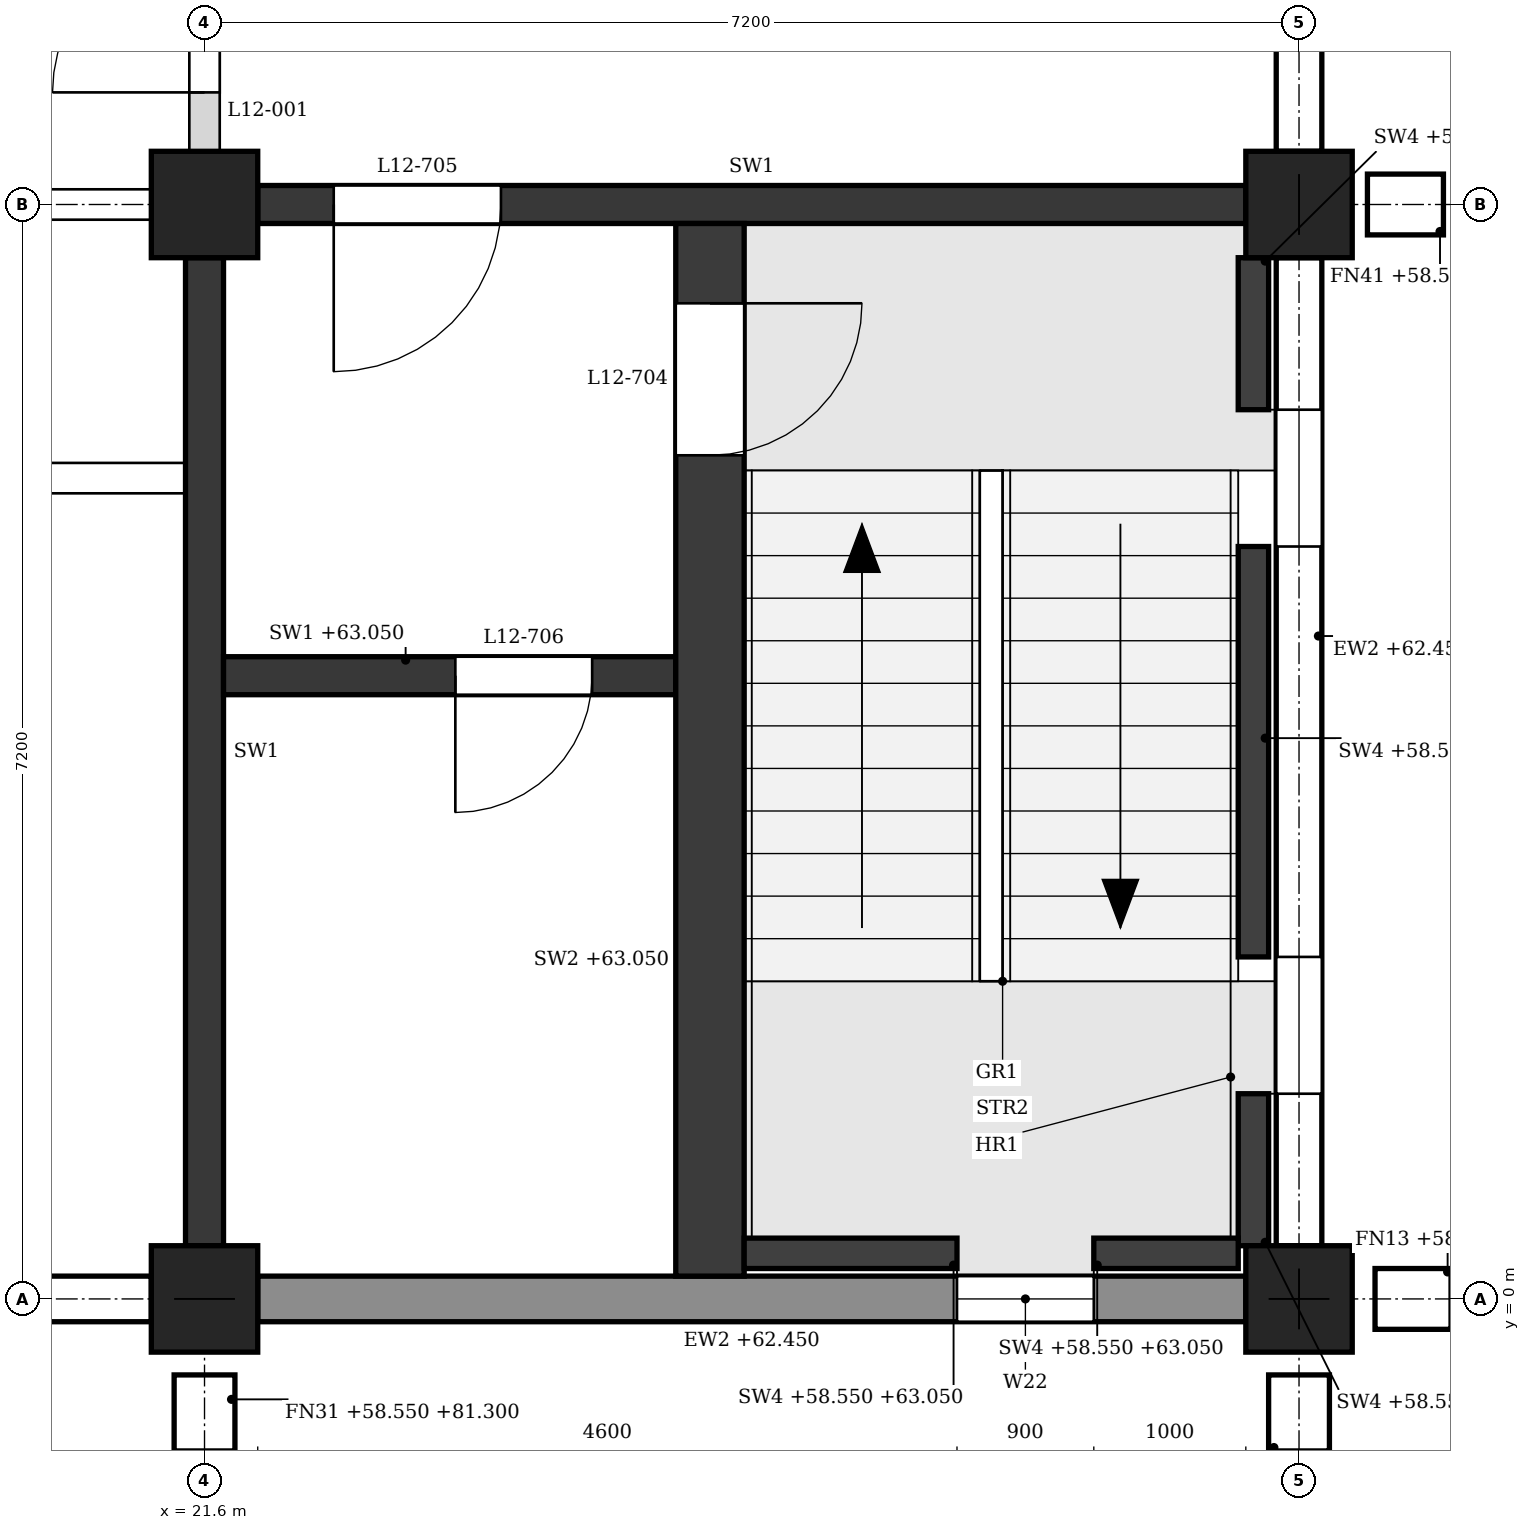
"""IFC4 building model, lengths in metres.
Left out: names, types, materials, properties, quantities, classifications, styles, units other than length and angle.
Written with IfcOpenShell. Run it as: python <this file> out.ifc"""

import sys

from ifc_helpers import new_model, si_unit, direction, frame, frame_2d, origin, origin_2d, place, context, subcontext, project, spatial, polyline, rectangle, outline, extrude, element, fill, save


model = new_model("IFC4")
c1 = context("Model", 3, precision=1e-05, world=origin(), true_north=direction((0.0, 1.0)))
c2 = subcontext(c1, "Body", "Model", "MODEL_VIEW")
j1 = project(units=[si_unit("LENGTHUNIT", "METRE"), si_unit("PLANEANGLEUNIT", "RADIAN")], contexts=[c1])
p1 = place(None, origin())
s1 = spatial("IfcSite", under=j1, at=p1, CompositionType="ELEMENT")
p2 = place(p1, origin())
s2 = spatial("IfcBuilding", under=s1, at=p2, CompositionType="ELEMENT")
p3 = place(p2, frame((0.0, 0.0, 58.8)))
s3 = spatial("IfcBuildingStorey", under=s2, at=p3, CompositionType="ELEMENT", Elevation=58.8)
for number, where, z_axis, x_axis in (
    (1, (21.6, 0.0, 0.0), (0.0, 0.0, 1.0), (1.0, 0.0, 0.0)),
    (2, (21.6, 7.2, 0.0), (0.0, 0.0, 1.0), (1.0, 0.0, 0.0)),
    (3, (28.8, 0.0, 0.0), (0.0, 0.0, 1.0), (1.0, 0.0, 0.0)),
    (4, (28.8, 7.2, 0.0), (0.0, 0.0, 1.0), (1.0, 0.0, 0.0)),
):
    element("IfcColumn", number, at=place(p3, frame(where, z_axis=z_axis, x_axis=x_axis)), inside=s3, PredefinedType="COLUMN", context=c2, shape_type="SweptSolid", body=[
        extrude(rectangle(XDim=0.7, YDim=0.7, at=origin_2d()), origin(), (0.0, 0.0, 1.0), 4.5),
    ])
p4 = place(p3, frame((14.75, 0.0, 0.0), z_axis=(0.0, 0.0, 1.0), x_axis=(1.0, 0.0, 0.0)))
e5 = element("IfcWall", 5, at=p4, inside=s3, PredefinedType="STANDARD", context=c2, shape_type="SweptSolid", body=[
    extrude(rectangle(XDim=6.5, YDim=0.3, at=frame_2d((3.25, 0.0))), origin(), (0.0, 0.0, 1.0), 3.65),
])
p5 = place(p4, frame((0.7, 0.0, 0.9)))
e6 = element("IfcOpeningElement", 6, at=p5, cuts=e5, PredefinedType="OPENING", context=c2, shape_type="SweptSolid", body=[
    extrude(outline(polyline([(0.0, 0.0), (1.5, 0.0), (1.5, 1.95), (0.75, 2.7), (0.0, 1.95), (0.0, 0.0)])), frame((0.0, 0.16, 0.0), z_axis=(0.0, -1.0, 0.0), x_axis=(1.0, 0.0, 0.0)), (0.0, 0.0, 1.0), 0.32),
])
p6 = place(p4, frame((4.3, 0.0, 0.9)))
e7 = element("IfcOpeningElement", 7, at=p6, cuts=e5, PredefinedType="OPENING", context=c2, shape_type="SweptSolid", body=[
    extrude(outline(polyline([(0.0, 0.0), (1.5, 0.0), (1.5, 1.95), (0.75, 2.7), (0.0, 1.95), (0.0, 0.0)])), frame((0.0, 0.16, 0.0), z_axis=(0.0, -1.0, 0.0), x_axis=(1.0, 0.0, 0.0)), (0.0, 0.0, 1.0), 0.32),
])
p7 = place(p3, frame((21.95, 0.0, 0.0), z_axis=(0.0, 0.0, 1.0), x_axis=(1.0, 0.0, 0.0)))
e8 = element("IfcWall", 8, at=p7, inside=s3, PredefinedType="STANDARD", context=c2, shape_type="SweptSolid", body=[
    extrude(rectangle(XDim=6.5, YDim=0.3, at=frame_2d((3.25, 0.0))), origin(), (0.0, 0.0, 1.0), 3.65),
])
p8 = place(p7, frame((4.6, 0.0, 0.9)))
e9 = element("IfcOpeningElement", 9, at=p8, cuts=e8, PredefinedType="OPENING", context=c2, shape_type="SweptSolid", body=[
    extrude(outline(polyline([(0.0, 0.0), (0.9, 0.0), (0.9, 2.25), (0.45, 2.7), (0.0, 2.25), (0.0, 0.0)])), frame((0.0, 0.16, 0.0), z_axis=(0.0, -1.0, 0.0), x_axis=(1.0, 0.0, 0.0)), (0.0, 0.0, 1.0), 0.32),
])
p9 = place(p3, frame((28.8, 0.35, 0.0), z_axis=(0.0, 0.0, 1.0), x_axis=(0.0, 1.0, 0.0)))
e10 = element("IfcWall", 10, at=p9, inside=s3, PredefinedType="STANDARD", context=c2, shape_type="SweptSolid", body=[
    extrude(rectangle(XDim=6.5, YDim=0.3, at=frame_2d((3.25, 0.0))), origin(), (0.0, 0.0, 1.0), 3.65),
])
p10 = place(p9, frame((1.0, 0.0, 0.9)))
e11 = element("IfcOpeningElement", 11, at=p10, cuts=e10, PredefinedType="OPENING", context=c2, shape_type="SweptSolid", body=[
    extrude(outline(polyline([(0.0, 0.0), (0.9, 0.0), (0.9, 2.25), (0.45, 2.7), (0.0, 2.25), (0.0, 0.0)])), frame((0.0, 0.16, 0.0), z_axis=(0.0, -1.0, 0.0), x_axis=(1.0, 0.0, 0.0)), (0.0, 0.0, 1.0), 0.32),
])
p11 = place(p9, frame((4.6, 0.0, 0.9)))
e12 = element("IfcOpeningElement", 12, at=p11, cuts=e10, PredefinedType="OPENING", context=c2, shape_type="SweptSolid", body=[
    extrude(outline(polyline([(0.0, 0.0), (0.9, 0.0), (0.9, 2.25), (0.45, 2.7), (0.0, 2.25), (0.0, 0.0)])), frame((0.0, 0.16, 0.0), z_axis=(0.0, -1.0, 0.0), x_axis=(1.0, 0.0, 0.0)), (0.0, 0.0, 1.0), 0.32),
])
p12 = place(p3, frame((28.8, 7.55, 0.0), z_axis=(0.0, 0.0, 1.0), x_axis=(0.0, 1.0, 0.0)))
e13 = element("IfcWall", 13, at=p12, inside=s3, PredefinedType="STANDARD", context=c2, shape_type="SweptSolid", body=[
    extrude(rectangle(XDim=6.5, YDim=0.3, at=frame_2d((3.25, 0.0))), origin(), (0.0, 0.0, 1.0), 3.65),
])
p13 = place(p12, frame((0.7, 0.0, 0.9)))
e14 = element("IfcOpeningElement", 14, at=p13, cuts=e13, PredefinedType="OPENING", context=c2, shape_type="SweptSolid", body=[
    extrude(outline(polyline([(0.0, 0.0), (1.5, 0.0), (1.5, 1.95), (0.75, 2.7), (0.0, 1.95), (0.0, 0.0)])), frame((0.0, 0.16, 0.0), z_axis=(0.0, -1.0, 0.0), x_axis=(1.0, 0.0, 0.0)), (0.0, 0.0, 1.0), 0.32),
])
p14 = place(p3, frame((21.6, -0.5, -0.25), z_axis=(0.0, 0.0, 1.0), x_axis=(0.0, -1.0, 0.0)))
e15 = element("IfcWall", 15, at=p14, inside=s3, PredefinedType="POLYGONAL", context=c2, shape_type="SweptSolid", body=[
    extrude(outline(polyline([(0.5, 0.0), (0.5, 22.225), (0.15, 22.75), (0.0, 22.75), (0.0, 0.0), (0.5, 0.0)])), frame((0.0, 0.2, 0.0), z_axis=(0.0, -1.0, 0.0), x_axis=(1.0, 0.0, 0.0)), (0.0, 0.0, 1.0), 0.4),
])
for number, where, z_axis, x_axis in (
    (16, (28.8, -0.5, -0.25), (0.0, 0.0, 1.0), (0.0, -1.0, 0.0)),
    (17, (29.3, 0.0, -0.25), (0.0, 0.0, 1.0), (1.0, 0.0, 0.0)),
):
    element("IfcWall", number, at=place(p3, frame(where, z_axis=z_axis, x_axis=x_axis)), inside=s3, PredefinedType="POLYGONAL", context=c2, shape_type="SweptSolid", body=[
        extrude(outline(polyline([(0.5, 0.0), (0.5, 23.85), (0.0, 23.85), (0.0, 0.0), (0.5, 0.0)])), frame((0.0, 0.2, 0.0), z_axis=(0.0, -1.0, 0.0), x_axis=(1.0, 0.0, 0.0)), (0.0, 0.0, 1.0), 0.4),
    ])
p15 = place(p3, frame((29.25, 7.2, -0.25), z_axis=(0.0, 0.0, 1.0), x_axis=(1.0, 0.0, 0.0)))
e18 = element("IfcWall", 18, at=p15, inside=s3, PredefinedType="POLYGONAL", context=c2, shape_type="SweptSolid", body=[
    extrude(outline(polyline([(0.5, 0.0), (0.5, 22.225), (0.15, 22.75), (0.0, 22.75), (0.0, 0.0), (0.5, 0.0)])), frame((0.0, 0.2, 0.0), z_axis=(0.0, -1.0, 0.0), x_axis=(1.0, 0.0, 0.0)), (0.0, 0.0, 1.0), 0.4),
])
p16 = place(p3, frame((21.95, 7.2, 0.0), z_axis=(0.0, 0.0, 1.0), x_axis=(1.0, 0.0, 0.0)))
e19 = element("IfcWall", 19, at=p16, inside=s3, PredefinedType="SHEAR", context=c2, shape_type="SweptSolid", body=[
    extrude(rectangle(XDim=6.5, YDim=0.25, at=frame_2d((3.25, 0.0))), origin(), (0.0, 0.0, 1.0), 3.6),
])
p17 = place(p16, frame((0.5, 0.0, 0.0)))
e20 = element("IfcOpeningElement", 20, at=p17, cuts=e19, PredefinedType="OPENING", context=c2, shape_type="SweptSolid", body=[
    extrude(rectangle(XDim=1.1, YDim=2.1, at=frame_2d((0.55, 1.05))), frame((0.0, 0.135, 0.0), z_axis=(0.0, -1.0, 0.0), x_axis=(1.0, 0.0, 0.0)), (0.0, 0.0, 1.0), 0.27),
])
p18 = place(p3, frame((21.6, 0.35, 0.0), z_axis=(0.0, 0.0, 1.0), x_axis=(0.0, 1.0, 0.0)))
e21 = element("IfcWall", 21, at=p18, inside=s3, PredefinedType="SHEAR", context=c2, shape_type="SweptSolid", body=[
    extrude(rectangle(XDim=6.5, YDim=0.25, at=frame_2d((3.25, 0.0))), origin(), (0.0, 0.0, 1.0), 3.6),
])
p19 = place(p3, frame((28.5, 0.35, -0.25), z_axis=(0.0, 0.0, 1.0), x_axis=(0.0, 1.0, 0.0)))
e22 = element("IfcWall", 22, at=p19, inside=s3, PredefinedType="SHEAR", context=c2, shape_type="SweptSolid", body=[
    extrude(rectangle(XDim=1.0, YDim=0.2, at=frame_2d((0.5, 0.0))), origin(), (0.0, 0.0, 1.0), 4.5),
])
p20 = place(p3, frame((28.5, 2.25, -0.25), z_axis=(0.0, 0.0, 1.0), x_axis=(0.0, 1.0, 0.0)))
e23 = element("IfcWall", 23, at=p20, inside=s3, PredefinedType="SHEAR", context=c2, shape_type="SweptSolid", body=[
    extrude(rectangle(XDim=2.7, YDim=0.2, at=frame_2d((1.35, 0.0))), origin(), (0.0, 0.0, 1.0), 4.5),
])
p21 = place(p3, frame((28.5, 5.85, -0.25), z_axis=(0.0, 0.0, 1.0), x_axis=(0.0, 1.0, 0.0)))
e24 = element("IfcWall", 24, at=p21, inside=s3, PredefinedType="SHEAR", context=c2, shape_type="SweptSolid", body=[
    extrude(rectangle(XDim=1.0, YDim=0.2, at=frame_2d((0.5, 0.0))), origin(), (0.0, 0.0, 1.0), 4.5),
])
p22 = place(p3, frame((25.15, 0.3, -0.25), z_axis=(0.0, 0.0, 1.0), x_axis=(1.0, 0.0, 0.0)))
e25 = element("IfcWall", 25, at=p22, inside=s3, PredefinedType="SHEAR", context=c2, shape_type="SweptSolid", body=[
    extrude(rectangle(XDim=1.4, YDim=0.2, at=frame_2d((0.7, 0.0))), origin(), (0.0, 0.0, 1.0), 4.5),
])
p23 = place(p3, frame((27.45, 0.3, -0.25), z_axis=(0.0, 0.0, 1.0), x_axis=(1.0, 0.0, 0.0)))
e26 = element("IfcWall", 26, at=p23, inside=s3, PredefinedType="SHEAR", context=c2, shape_type="SweptSolid", body=[
    extrude(rectangle(XDim=0.95, YDim=0.2, at=frame_2d((0.475, 0.0))), origin(), (0.0, 0.0, 1.0), 4.5),
])
p24 = place(p3, frame((24.925, 0.15, 0.0), z_axis=(0.0, 0.0, 1.0), x_axis=(0.0, 1.0, 0.0)))
e27 = element("IfcWall", 27, at=p24, inside=s3, PredefinedType="SHEAR", context=c2, shape_type="SweptSolid", body=[
    extrude(rectangle(XDim=6.925, YDim=0.45, at=frame_2d((3.462, 0.0))), origin(), (0.0, 0.0, 1.0), 4.25),
])
p25 = place(p24, frame((5.4, 0.0, 0.0)))
e28 = element("IfcOpeningElement", 28, at=p25, cuts=e27, PredefinedType="OPENING", context=c2, shape_type="SweptSolid", body=[
    extrude(rectangle(XDim=1.0, YDim=2.1, at=frame_2d((0.5, 1.05))), frame((0.0, 0.235, 0.0), z_axis=(0.0, -1.0, 0.0), x_axis=(1.0, 0.0, 0.0)), (0.0, 0.0, 1.0), 0.47),
])
p26 = place(p3, frame((21.725, 4.1, 0.0), z_axis=(0.0, 0.0, 1.0), x_axis=(1.0, 0.0, 0.0)))
e29 = element("IfcWall", 29, at=p26, inside=s3, PredefinedType="SHEAR", context=c2, shape_type="SweptSolid", body=[
    extrude(rectangle(XDim=2.975, YDim=0.25, at=frame_2d((1.487, 0.0))), origin(), (0.0, 0.0, 1.0), 4.25),
])
p27 = place(p26, frame((1.525, 0.0, 0.0)))
e30 = element("IfcOpeningElement", 30, at=p27, cuts=e29, PredefinedType="OPENING", context=c2, shape_type="SweptSolid", body=[
    extrude(rectangle(XDim=0.9, YDim=2.1, at=frame_2d((0.45, 1.05))), frame((0.0, 0.135, 0.0), z_axis=(0.0, -1.0, 0.0), x_axis=(1.0, 0.0, 0.0)), (0.0, 0.0, 1.0), 0.27),
])
p28 = place(p3, frame((7.325, 5.4, 0.0), z_axis=(0.0, 0.0, 1.0), x_axis=(1.0, 0.0, 0.0)))
e31 = element("IfcWall", 31, at=p28, inside=s3, PredefinedType="PARTITIONING", context=c2, shape_type="SweptSolid", body=[
    extrude(outline(polyline([(0.0, 0.0), (14.15, 0.0), (14.15, 3.6), (14.075, 3.6), (14.075, 4.25), (7.275, 4.25), (7.275, 3.6), (6.875, 3.6), (6.875, 4.25), (0.075, 4.25), (0.075, 3.6), (0.0, 3.6), (0.0, 0.0)])), frame((0.0, 0.1, 0.0), z_axis=(0.0, -1.0, 0.0), x_axis=(1.0, 0.0, 0.0)), (0.0, 0.0, 1.0), 0.2),
])
p29 = place(p28, frame((1.238, 0.0, 0.0)))
e32 = element("IfcOpeningElement", 32, at=p29, cuts=e31, PredefinedType="OPENING", context=c2, shape_type="SweptSolid", body=[
    extrude(rectangle(XDim=1.0, YDim=2.1, at=frame_2d((0.5, 1.05))), frame((0.0, 0.11, 0.0), z_axis=(0.0, -1.0, 0.0), x_axis=(1.0, 0.0, 0.0)), (0.0, 0.0, 1.0), 0.22),
])
p30 = place(p28, frame((4.775, 0.0, 0.0)))
e33 = element("IfcOpeningElement", 33, at=p30, cuts=e31, PredefinedType="OPENING", context=c2, shape_type="SweptSolid", body=[
    extrude(rectangle(XDim=1.0, YDim=2.1, at=frame_2d((0.5, 1.05))), frame((0.0, 0.11, 0.0), z_axis=(0.0, -1.0, 0.0), x_axis=(1.0, 0.0, 0.0)), (0.0, 0.0, 1.0), 0.22),
])
p31 = place(p28, frame((8.375, 0.0, 0.0)))
e34 = element("IfcOpeningElement", 34, at=p31, cuts=e31, PredefinedType="OPENING", context=c2, shape_type="SweptSolid", body=[
    extrude(rectangle(XDim=1.0, YDim=2.1, at=frame_2d((0.5, 1.05))), frame((0.0, 0.11, 0.0), z_axis=(0.0, -1.0, 0.0), x_axis=(1.0, 0.0, 0.0)), (0.0, 0.0, 1.0), 0.22),
])
p32 = place(p28, frame((11.913, 0.0, 0.0)))
e35 = element("IfcOpeningElement", 35, at=p32, cuts=e31, PredefinedType="OPENING", context=c2, shape_type="SweptSolid", body=[
    extrude(rectangle(XDim=1.0, YDim=2.1, at=frame_2d((0.5, 1.05))), frame((0.0, 0.11, 0.0), z_axis=(0.0, -1.0, 0.0), x_axis=(1.0, 0.0, 0.0)), (0.0, 0.0, 1.0), 0.22),
])
p33 = place(p3, frame((14.75, 7.2, 0.0), z_axis=(0.0, 0.0, 1.0), x_axis=(1.0, 0.0, 0.0)))
e36 = element("IfcWall", 36, at=p33, inside=s3, PredefinedType="PARTITIONING", context=c2, shape_type="SweptSolid", body=[
    extrude(rectangle(XDim=6.5, YDim=0.2, at=frame_2d((3.25, 0.0))), origin(), (0.0, 0.0, 1.0), 3.6),
])
p34 = place(p33, frame((4.375, 0.0, 0.0)))
e37 = element("IfcOpeningElement", 37, at=p34, cuts=e36, PredefinedType="OPENING", context=c2, shape_type="SweptSolid", body=[
    extrude(rectangle(XDim=1.0, YDim=2.1, at=frame_2d((0.5, 1.05))), frame((0.0, 0.11, 0.0), z_axis=(0.0, -1.0, 0.0), x_axis=(1.0, 0.0, 0.0)), (0.0, 0.0, 1.0), 0.22),
])
p35 = place(p3, frame((21.6, 7.55, 0.0), z_axis=(0.0, 0.0, 1.0), x_axis=(0.0, 1.0, 0.0)))
e38 = element("IfcWall", 38, at=p35, inside=s3, PredefinedType="PARTITIONING", context=c2, shape_type="SweptSolid", body=[
    extrude(rectangle(XDim=2.775, YDim=0.2, at=frame_2d((1.387, 0.0))), origin(), (0.0, 0.0, 1.0), 3.6),
])
p36 = place(p35, frame((0.387, 0.0, 0.0)))
e39 = element("IfcOpeningElement", 39, at=p36, cuts=e38, PredefinedType="OPENING", context=c2, shape_type="SweptSolid", body=[
    extrude(rectangle(XDim=2.0, YDim=2.4, at=frame_2d((1.0, 1.2))), frame((0.0, 0.11, 0.0), z_axis=(0.0, -1.0, 0.0), x_axis=(1.0, 0.0, 0.0)), (0.0, 0.0, 1.0), 0.22),
])
p37 = place(p10, origin())
e40 = element("IfcWindow", 40, at=p37, inside=s3, PartitioningType="SINGLE_PANEL", PredefinedType="WINDOW", context=c2, shape_type="SweptSolid", body=[
    extrude(outline(polyline([(0.0, 0.0), (0.9, 0.0), (0.9, 2.25), (0.45, 2.7), (0.0, 2.25), (0.0, 0.0)])), frame((0.0, 0.03, 0.0), z_axis=(0.0, -1.0, 0.0), x_axis=(1.0, 0.0, 0.0)), (0.0, 0.0, 1.0), 0.06),
])
fill(e11, e40)
p38 = place(p11, origin())
e41 = element("IfcWindow", 41, at=p38, inside=s3, PartitioningType="SINGLE_PANEL", PredefinedType="WINDOW", context=c2, shape_type="SweptSolid", body=[
    extrude(outline(polyline([(0.0, 0.0), (0.9, 0.0), (0.9, 2.25), (0.45, 2.7), (0.0, 2.25), (0.0, 0.0)])), frame((0.0, 0.03, 0.0), z_axis=(0.0, -1.0, 0.0), x_axis=(1.0, 0.0, 0.0)), (0.0, 0.0, 1.0), 0.06),
])
fill(e12, e41)
p39 = place(p8, origin())
e42 = element("IfcWindow", 42, at=p39, inside=s3, PartitioningType="SINGLE_PANEL", PredefinedType="WINDOW", context=c2, shape_type="SweptSolid", body=[
    extrude(outline(polyline([(0.0, 0.0), (0.9, 0.0), (0.9, 2.25), (0.45, 2.7), (0.0, 2.25), (0.0, 0.0)])), frame((0.0, 0.03, 0.0), z_axis=(0.0, -1.0, 0.0), x_axis=(1.0, 0.0, 0.0)), (0.0, 0.0, 1.0), 0.06),
])
fill(e9, e42)
p40 = place(p25, frame((1.0, 0.0, 0.0), z_axis=(0.0, 0.0, 1.0), x_axis=(-1.0, 0.0, 0.0)))
e43 = element("IfcDoor", 43, at=p40, inside=s3, OperationType="SINGLE_SWING_LEFT", PredefinedType="DOOR", context=c2, shape_type="SweptSolid", body=[
    extrude(rectangle(XDim=1.0, YDim=2.1, at=frame_2d((0.5, 1.05))), frame((0.0, 0.025, 0.0), z_axis=(0.0, -1.0, 0.0), x_axis=(1.0, 0.0, 0.0)), (0.0, 0.0, 1.0), 0.05),
])
fill(e28, e43)
p41 = place(p17, frame((1.1, 0.0, 0.0), z_axis=(0.0, 0.0, 1.0), x_axis=(-1.0, 0.0, 0.0)))
e44 = element("IfcDoor", 44, at=p41, inside=s3, OperationType="SINGLE_SWING_RIGHT", PredefinedType="DOOR", context=c2, shape_type="SweptSolid", body=[
    extrude(rectangle(XDim=1.1, YDim=2.1, at=frame_2d((0.55, 1.05))), frame((0.0, 0.025, 0.0), z_axis=(0.0, -1.0, 0.0), x_axis=(1.0, 0.0, 0.0)), (0.0, 0.0, 1.0), 0.05),
])
fill(e20, e44)
p42 = place(p27, frame((0.9, 0.0, 0.0), z_axis=(0.0, 0.0, 1.0), x_axis=(-1.0, 0.0, 0.0)))
e45 = element("IfcDoor", 45, at=p42, inside=s3, OperationType="SINGLE_SWING_RIGHT", PredefinedType="DOOR", context=c2, shape_type="SweptSolid", body=[
    extrude(rectangle(XDim=0.9, YDim=2.1, at=frame_2d((0.45, 1.05))), frame((0.0, 0.025, 0.0), z_axis=(0.0, -1.0, 0.0), x_axis=(1.0, 0.0, 0.0)), (0.0, 0.0, 1.0), 0.05),
])
fill(e30, e45)
p43 = place(p36, origin())
e46 = element("IfcDoor", 46, at=p43, inside=s3, OperationType="DOUBLE_DOOR_SINGLE_SWING", PredefinedType="DOOR", context=c2, shape_type="SweptSolid", body=[
    extrude(rectangle(XDim=2.0, YDim=2.4, at=frame_2d((1.0, 1.2))), frame((0.0, 0.025, 0.0), z_axis=(0.0, -1.0, 0.0), x_axis=(1.0, 0.0, 0.0)), (0.0, 0.0, 1.0), 0.05),
])
fill(e39, e46)
save(model, sys.argv[1])
